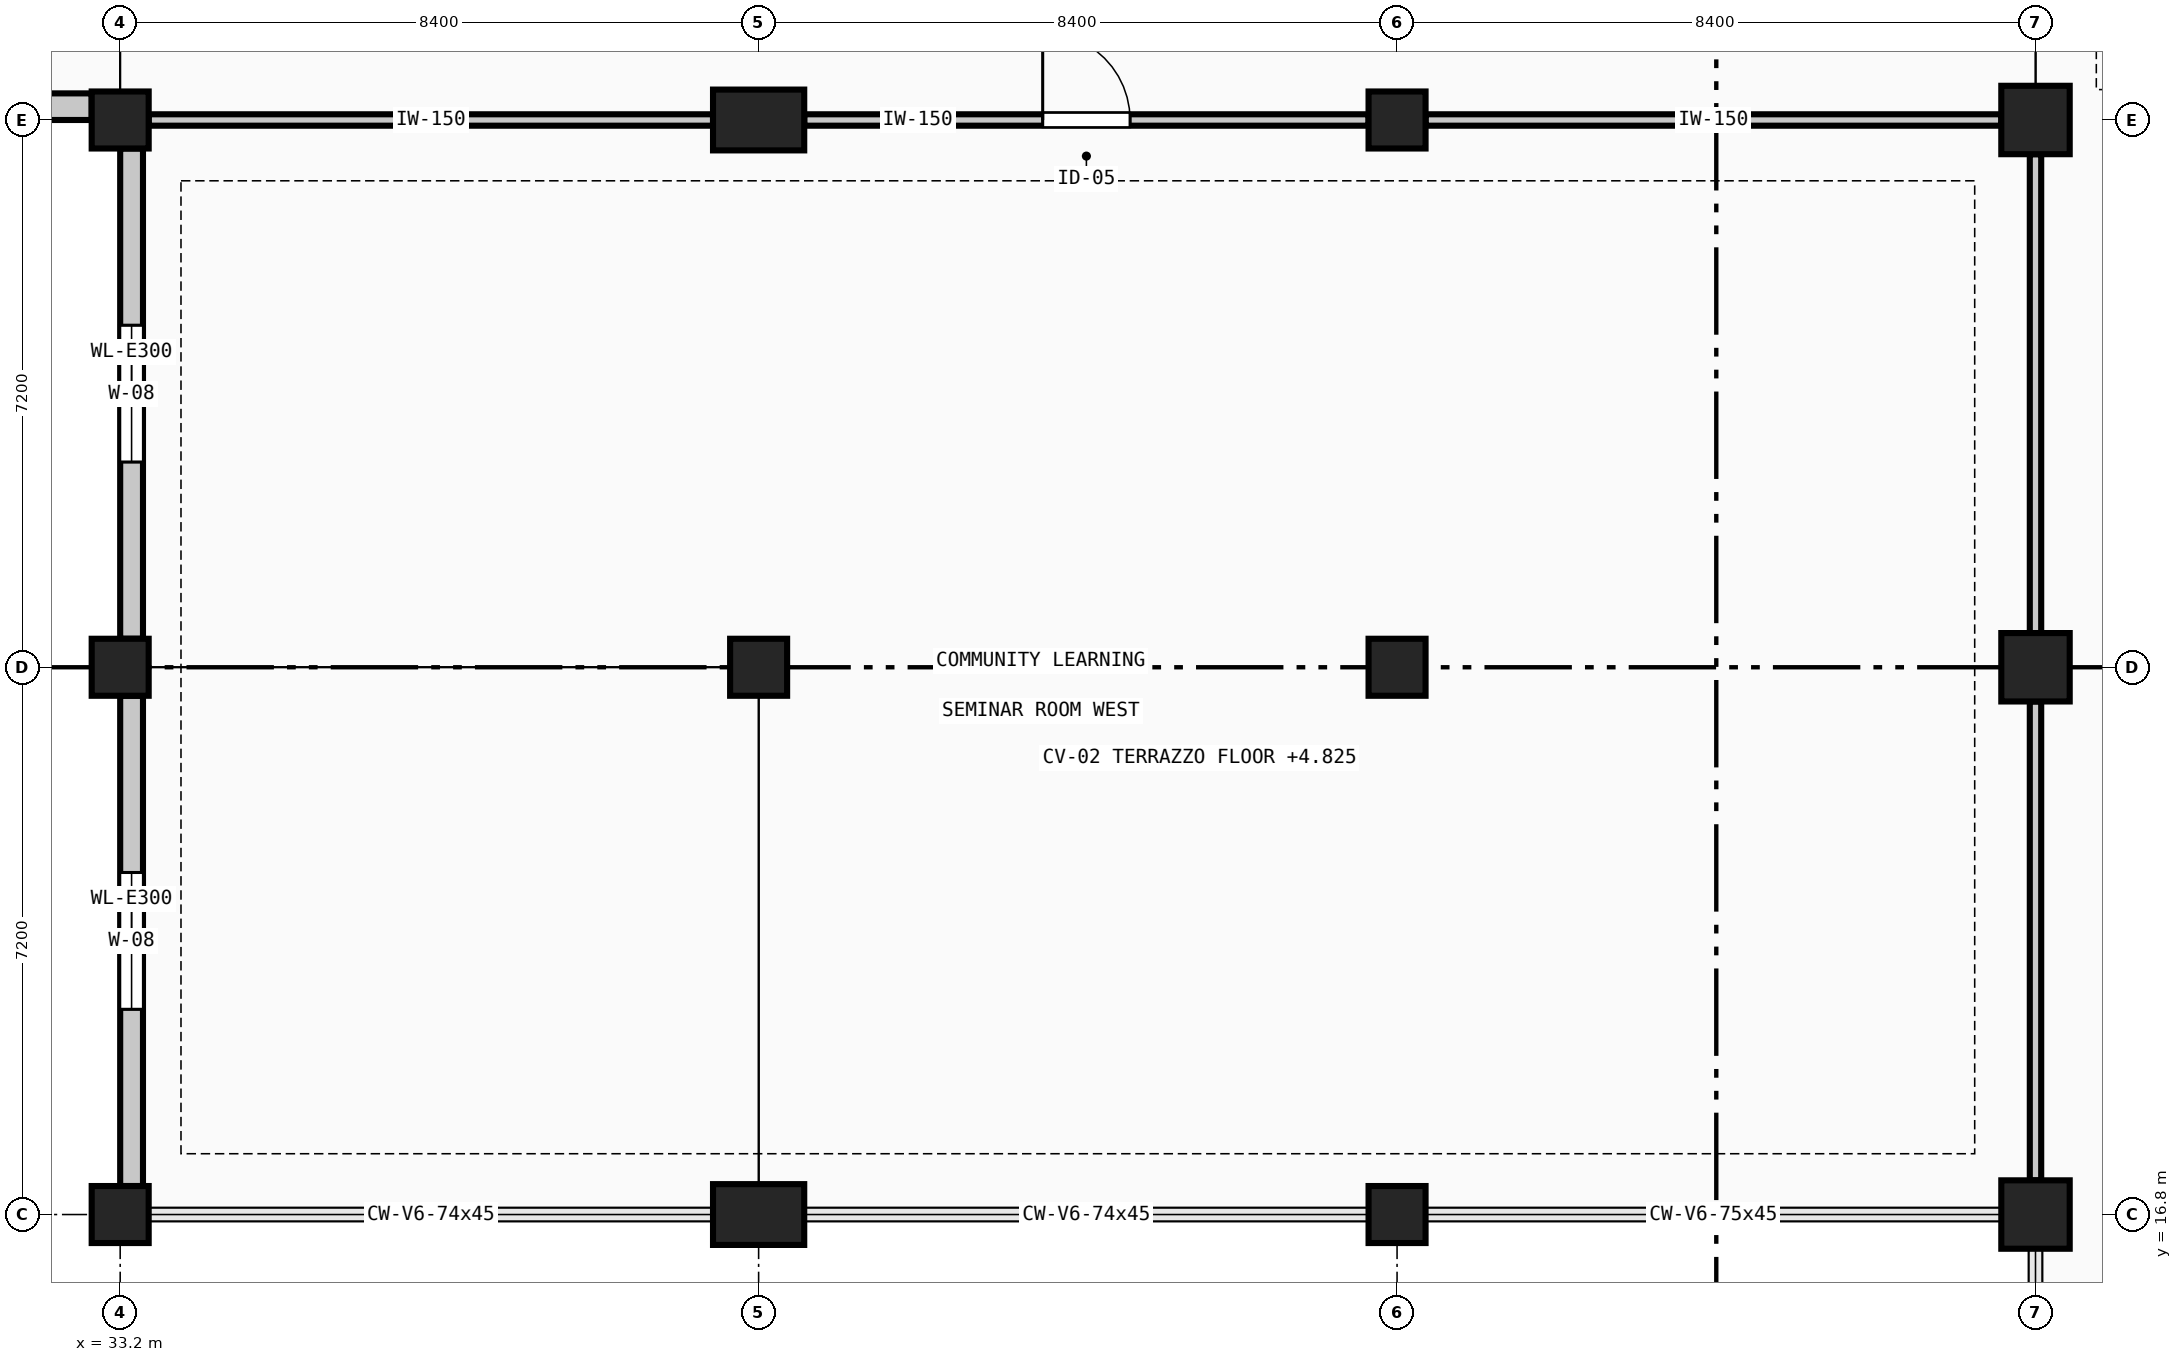
"""IFC4 building model, lengths in metres.
Left out: names, types, materials, properties, quantities, classifications, styles, units other than length and angle.
Written with IfcOpenShell. Run it as: python <this file> out.ifc"""

import sys

from ifc_helpers import new_model, si_unit, direction, frame, frame_2d, origin, origin_2d, place, context, subcontext, project, spatial, rectangle, extrude, element, fill, save


model = new_model("IFC4")
c1 = context("Model", 3, precision=1e-05, world=origin(), true_north=direction((0.0, 1.0)))
c2 = subcontext(c1, "Body", "Model", "MODEL_VIEW")
j1 = project(units=[si_unit("LENGTHUNIT", "METRE"), si_unit("PLANEANGLEUNIT", "RADIAN")], contexts=[c1])
p1 = place(None, origin())
s1 = spatial("IfcSite", under=j1, at=p1, CompositionType="ELEMENT")
p2 = place(p1, origin())
s2 = spatial("IfcBuilding", under=s1, at=p2, CompositionType="ELEMENT")
p3 = place(p2, frame((0.0, 0.0, 4.8)))
s3 = spatial("IfcBuildingStorey", under=s2, at=p3, CompositionType="ELEMENT", Elevation=4.8)
for number, where, z_axis, x_axis in (
    (1, (33.2, 16.8, 0.0), (0.0, 0.0, 1.0), (1.0, 0.0, 0.0)),
    (2, (33.2, 24.0, 0.0), (0.0, 0.0, 1.0), (1.0, 0.0, 0.0)),
    (3, (33.2, 31.2, 0.0), (0.0, 0.0, 1.0), (1.0, 0.0, 0.0)),
):
    element("IfcColumn", number, at=place(p3, frame(where, z_axis=z_axis, x_axis=x_axis)), inside=s3, PredefinedType="COLUMN", context=c2, shape_type="SweptSolid", body=[
        extrude(rectangle(XDim=0.75, YDim=0.75, at=origin_2d()), origin(), (0.0, 0.0, 1.0), 4.8),
    ])
p4 = place(p3, frame((41.6, 16.8, 0.0), z_axis=(0.0, 0.0, 1.0), x_axis=(1.0, 0.0, 0.0)))
e4 = element("IfcColumn", 4, at=p4, inside=s3, PredefinedType="COLUMN", context=c2, shape_type="SweptSolid", body=[
    extrude(rectangle(XDim=1.2, YDim=0.8, at=origin_2d()), origin(), (0.0, 0.0, 1.0), 4.8),
])
p5 = place(p3, frame((41.6, 24.0, 0.0), z_axis=(0.0, 0.0, 1.0), x_axis=(1.0, 0.0, 0.0)))
e5 = element("IfcColumn", 5, at=p5, inside=s3, PredefinedType="COLUMN", context=c2, shape_type="SweptSolid", body=[
    extrude(rectangle(XDim=0.75, YDim=0.75, at=origin_2d()), origin(), (0.0, 0.0, 1.0), 4.8),
])
p6 = place(p3, frame((41.6, 31.2, 0.0), z_axis=(0.0, 0.0, 1.0), x_axis=(1.0, 0.0, 0.0)))
e6 = element("IfcColumn", 6, at=p6, inside=s3, PredefinedType="COLUMN", context=c2, shape_type="SweptSolid", body=[
    extrude(rectangle(XDim=1.2, YDim=0.8, at=origin_2d()), origin(), (0.0, 0.0, 1.0), 4.8),
])
for number, where, z_axis, x_axis in (
    (7, (50.0, 16.8, 0.0), (0.0, 0.0, 1.0), (1.0, 0.0, 0.0)),
    (8, (50.0, 24.0, 0.0), (0.0, 0.0, 1.0), (1.0, 0.0, 0.0)),
    (9, (50.0, 31.2, 0.0), (0.0, 0.0, 1.0), (1.0, 0.0, 0.0)),
):
    element("IfcColumn", number, at=place(p3, frame(where, z_axis=z_axis, x_axis=x_axis)), inside=s3, PredefinedType="COLUMN", context=c2, shape_type="SweptSolid", body=[
        extrude(rectangle(XDim=0.75, YDim=0.75, at=origin_2d()), origin(), (0.0, 0.0, 1.0), 4.8),
    ])
for number, where, z_axis, x_axis in (
    (10, (58.4, 16.8, 0.0), (0.0, 0.0, 1.0), (1.0, 0.0, 0.0)),
    (11, (58.4, 24.0, 0.0), (0.0, 0.0, 1.0), (1.0, 0.0, 0.0)),
    (12, (58.4, 31.2, 0.0), (0.0, 0.0, 1.0), (1.0, 0.0, 0.0)),
):
    element("IfcColumn", number, at=place(p3, frame(where, z_axis=z_axis, x_axis=x_axis)), inside=s3, PredefinedType="COLUMN", context=c2, shape_type="SweptSolid", body=[
        extrude(rectangle(XDim=0.9, YDim=0.9, at=origin_2d()), origin(), (0.0, 0.0, 1.0), 4.8),
    ])
p7 = place(p3, frame((33.35, 17.175, 0.0), z_axis=(0.0, 0.0, 1.0), x_axis=(0.0, 1.0, 0.0)))
e13 = element("IfcWall", 13, at=p7, inside=s3, PredefinedType="SOLIDWALL", context=c2, shape_type="SweptSolid", body=[
    extrude(rectangle(XDim=6.45, YDim=0.3, at=frame_2d((3.225, 0.0))), origin(), (0.0, 0.0, 1.0), 4.2),
])
p8 = place(p7, frame((2.325, 0.0, 2.2)))
e14 = element("IfcOpeningElement", 14, at=p8, cuts=e13, PredefinedType="OPENING", context=c2, shape_type="SweptSolid", body=[
    extrude(rectangle(XDim=1.8, YDim=1.35, at=frame_2d((0.9, 0.675))), frame((0.0, 0.16, 0.0), z_axis=(0.0, -1.0, 0.0), x_axis=(1.0, 0.0, 0.0)), (0.0, 0.0, 1.0), 0.32),
])
p9 = place(p3, frame((33.35, 24.375, 0.0), z_axis=(0.0, 0.0, 1.0), x_axis=(0.0, 1.0, 0.0)))
e15 = element("IfcWall", 15, at=p9, inside=s3, PredefinedType="SOLIDWALL", context=c2, shape_type="SweptSolid", body=[
    extrude(rectangle(XDim=6.45, YDim=0.3, at=frame_2d((3.225, 0.0))), origin(), (0.0, 0.0, 1.0), 4.2),
])
p10 = place(p9, frame((2.325, 0.0, 2.2)))
e16 = element("IfcOpeningElement", 16, at=p10, cuts=e15, PredefinedType="OPENING", context=c2, shape_type="SweptSolid", body=[
    extrude(rectangle(XDim=1.8, YDim=1.35, at=frame_2d((0.9, 0.675))), frame((0.0, 0.16, 0.0), z_axis=(0.0, -1.0, 0.0), x_axis=(1.0, 0.0, 0.0)), (0.0, 0.0, 1.0), 0.32),
])
p11 = place(p3, frame((32.825, 31.375, 0.0), z_axis=(0.0, 0.0, 1.0), x_axis=(-1.0, 0.0, 0.0)))
e17 = element("IfcWall", 17, at=p11, inside=s3, PredefinedType="SOLIDWALL", context=c2, shape_type="SweptSolid", body=[
    extrude(rectangle(XDim=7.65, YDim=0.35, at=frame_2d((3.825, 0.0))), origin(), (0.0, 0.0, 1.0), 4.1),
])
p12 = place(p11, frame((2.925, 0.0, 2.2)))
e18 = element("IfcOpeningElement", 18, at=p12, cuts=e17, PredefinedType="OPENING", context=c2, shape_type="SweptSolid", body=[
    extrude(rectangle(XDim=1.8, YDim=1.35, at=frame_2d((0.9, 0.675))), frame((0.0, 0.185, 0.0), z_axis=(0.0, -1.0, 0.0), x_axis=(1.0, 0.0, 0.0)), (0.0, 0.0, 1.0), 0.37),
])
p13 = place(p3, frame((33.575, 31.2, 0.0), z_axis=(0.0, 0.0, 1.0), x_axis=(1.0, 0.0, 0.0)))
e19 = element("IfcWall", 19, at=p13, inside=s3, PredefinedType="PARTITIONING", context=c2, shape_type="SweptSolid", body=[
    extrude(rectangle(XDim=7.425, YDim=0.15, at=frame_2d((3.712, 0.0))), origin(), (0.0, 0.0, 1.0), 4.0),
])
p14 = place(p3, frame((42.2, 31.2, 0.0), z_axis=(0.0, 0.0, 1.0), x_axis=(1.0, 0.0, 0.0)))
e20 = element("IfcWall", 20, at=p14, inside=s3, PredefinedType="PARTITIONING", context=c2, shape_type="SweptSolid", body=[
    extrude(rectangle(XDim=7.425, YDim=0.15, at=frame_2d((3.712, 0.0))), origin(), (0.0, 0.0, 1.0), 4.0),
])
p15 = place(p14, frame((3.137, 0.0, 0.0)))
e21 = element("IfcOpeningElement", 21, at=p15, cuts=e20, PredefinedType="OPENING", context=c2, shape_type="SweptSolid", body=[
    extrude(rectangle(XDim=1.15, YDim=2.2, at=frame_2d((0.575, 1.1))), frame((0.0, 0.085, 0.0), z_axis=(0.0, -1.0, 0.0), x_axis=(1.0, 0.0, 0.0)), (0.0, 0.0, 1.0), 0.17),
])
p16 = place(p3, frame((50.375, 31.2, 0.0), z_axis=(0.0, 0.0, 1.0), x_axis=(1.0, 0.0, 0.0)))
e22 = element("IfcWall", 22, at=p16, inside=s3, PredefinedType="PARTITIONING", context=c2, shape_type="SweptSolid", body=[
    extrude(rectangle(XDim=7.575, YDim=0.15, at=frame_2d((3.788, 0.0))), origin(), (0.0, 0.0, 1.0), 4.0),
])
for number, where, z_axis, x_axis in (
    (23, (58.4, 30.75, 0.0), (0.0, 0.0, 1.0), (0.0, -1.0, 0.0)),
    (24, (58.4, 23.55, 0.0), (0.0, 0.0, 1.0), (0.0, -1.0, 0.0)),
):
    element("IfcWall", number, at=place(p3, frame(where, z_axis=z_axis, x_axis=x_axis)), inside=s3, PredefinedType="PARTITIONING", context=c2, shape_type="SweptSolid", body=[
        extrude(rectangle(XDim=6.3, YDim=0.15, at=frame_2d((3.15, 0.0))), origin(), (0.0, 0.0, 1.0), 3.9),
    ])
p17 = place(p8, origin())
e25 = element("IfcWindow", 25, at=p17, inside=s3, PartitioningType="SINGLE_PANEL", PredefinedType="WINDOW", context=c2, shape_type="SweptSolid", body=[
    extrude(rectangle(XDim=1.8, YDim=1.35, at=frame_2d((0.9, 0.675))), frame((0.0, 0.03, 0.0), z_axis=(0.0, -1.0, 0.0), x_axis=(1.0, 0.0, 0.0)), (0.0, 0.0, 1.0), 0.06),
])
fill(e14, e25)
p18 = place(p10, origin())
e26 = element("IfcWindow", 26, at=p18, inside=s3, PartitioningType="SINGLE_PANEL", PredefinedType="WINDOW", context=c2, shape_type="SweptSolid", body=[
    extrude(rectangle(XDim=1.8, YDim=1.35, at=frame_2d((0.9, 0.675))), frame((0.0, 0.03, 0.0), z_axis=(0.0, -1.0, 0.0), x_axis=(1.0, 0.0, 0.0)), (0.0, 0.0, 1.0), 0.06),
])
fill(e16, e26)
p19 = place(p15, origin())
e27 = element("IfcDoor", 27, at=p19, inside=s3, OperationType="SINGLE_SWING_LEFT", PredefinedType="DOOR", context=c2, shape_type="SweptSolid", body=[
    extrude(rectangle(XDim=1.15, YDim=2.2, at=frame_2d((0.575, 1.1))), frame((0.0, 0.025, 0.0), z_axis=(0.0, -1.0, 0.0), x_axis=(1.0, 0.0, 0.0)), (0.0, 0.0, 1.0), 0.05),
])
fill(e21, e27)
save(model, sys.argv[1])
